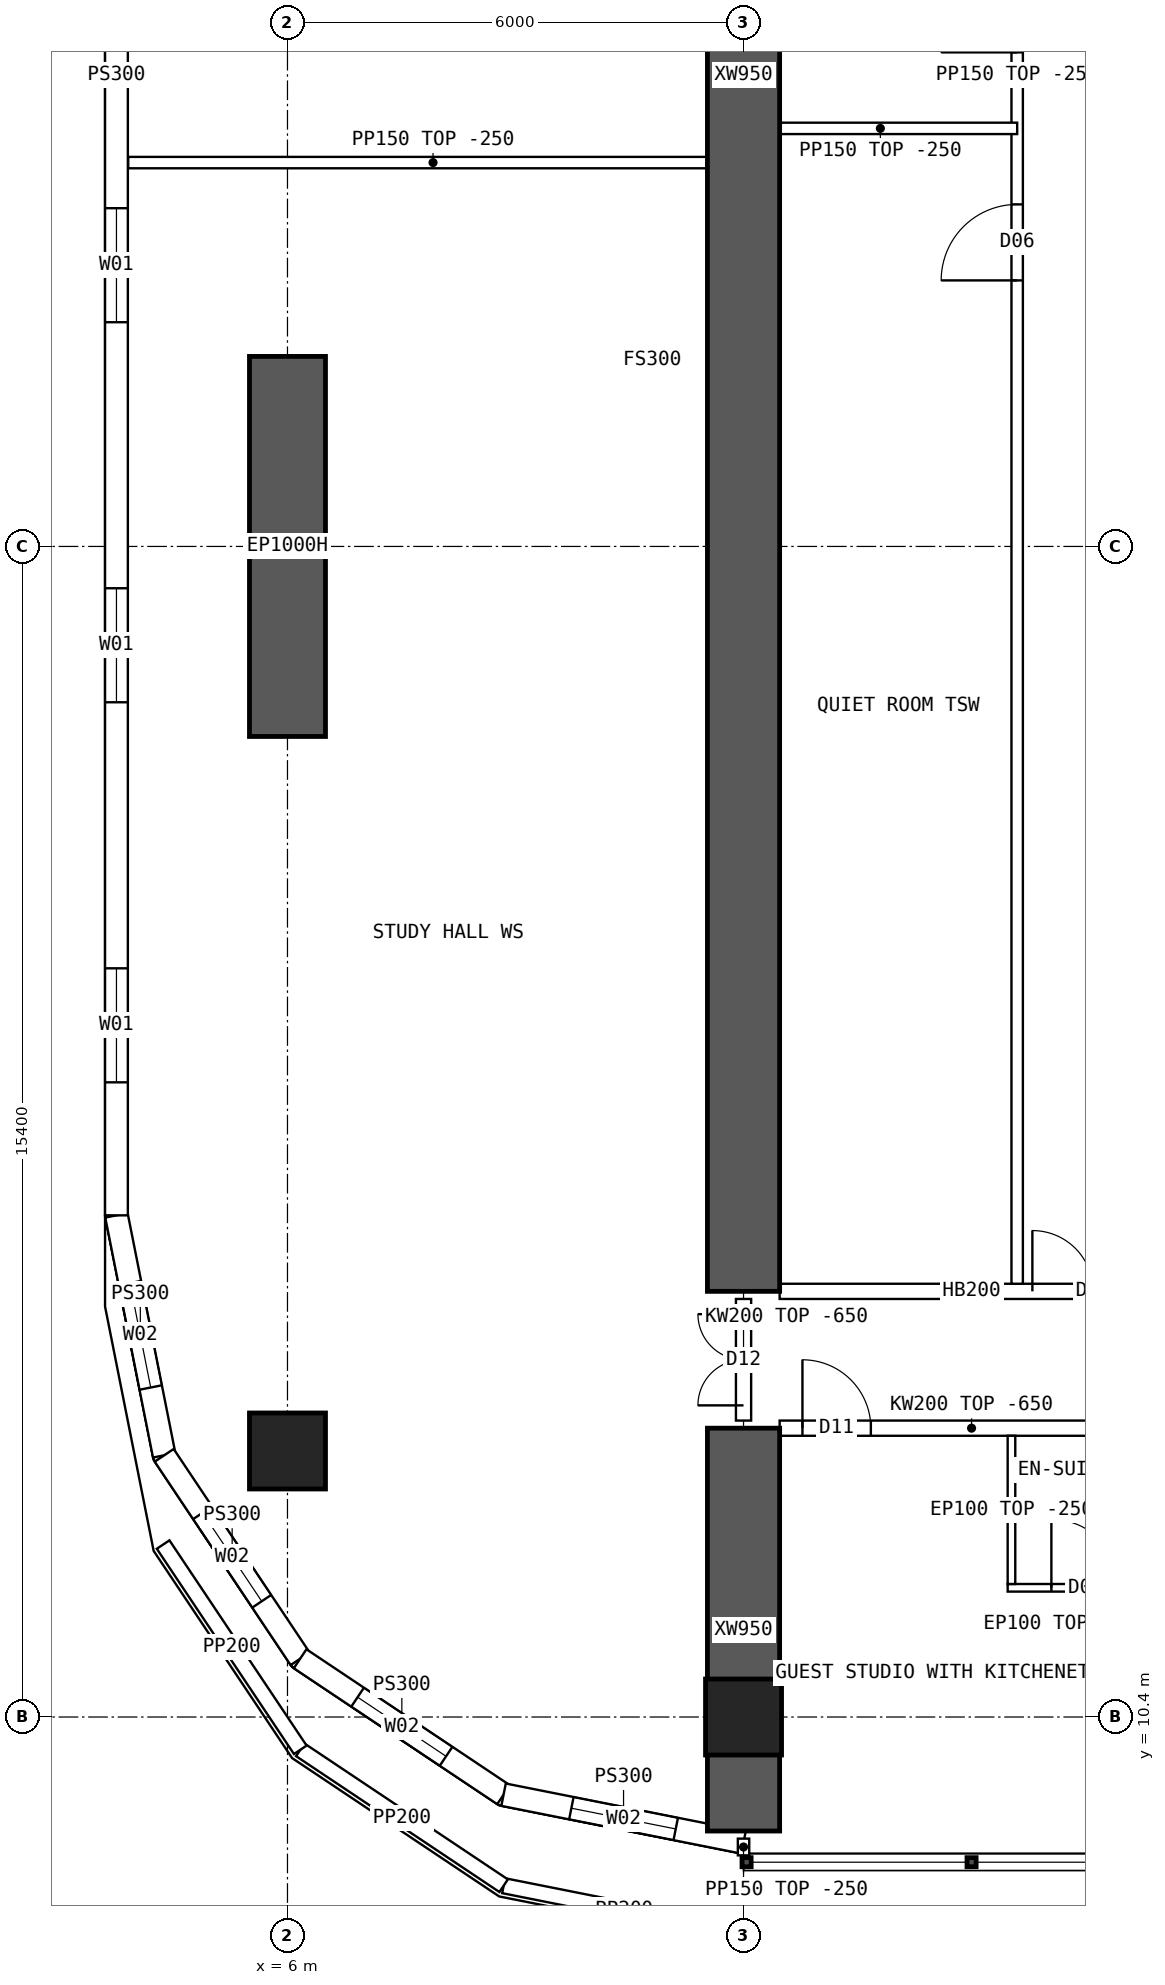
"""IFC4 building model, lengths in metres.
Left out: names, types, materials, properties, quantities, classifications, styles, units other than length and angle.
Written with IfcOpenShell. Run it as: python <this file> out.ifc"""

import sys

from ifc_helpers import new_model, si_unit, direction, frame, frame_2d, origin, origin_2d, place, context, subcontext, project, spatial, polyline, rectangle, hollow_rectangle, outline, extrude, element, fill, save


model = new_model("IFC4")
c1 = context("Model", 3, precision=1e-05, world=origin(), true_north=direction((0.0, 1.0)))
c2 = subcontext(c1, "Body", "Model", "MODEL_VIEW")
j1 = project(units=[si_unit("LENGTHUNIT", "METRE"), si_unit("PLANEANGLEUNIT", "RADIAN")], contexts=[c1])
p1 = place(None, origin())
s1 = spatial("IfcSite", under=j1, at=p1, CompositionType="ELEMENT")
p2 = place(p1, origin())
s2 = spatial("IfcBuilding", under=s1, at=p2, CompositionType="ELEMENT")
p3 = place(p2, frame((0.0, 0.0, 76.15)))
s3 = spatial("IfcBuildingStorey", under=s2, at=p3, CompositionType="ELEMENT", Elevation=76.15)
for number, where, z_axis, x_axis in (
    (1, (12.0, 10.4, 0.0), (0.0, 0.0, 1.0), (1.0, 0.0, 0.0)),
    (2, (6.0, 13.9, 0.0), (0.0, 0.0, 1.0), (1.0, 0.0, 0.0)),
):
    element("IfcColumn", number, at=place(p3, frame(where, z_axis=z_axis, x_axis=x_axis)), inside=s3, PredefinedType="COLUMN", context=c2, shape_type="SweptSolid", body=[
        extrude(hollow_rectangle(XDim=1.0, YDim=1.0, WallThickness=0.1, at=origin_2d()), origin(), (0.0, 0.0, 1.0), 4.5),
    ])
p4 = place(p3, frame((6.0, 23.3, 0.0), z_axis=(0.0, 0.0, 1.0), x_axis=(0.0, 1.0, 0.0)))
e3 = element("IfcWall", 3, at=p4, inside=s3, PredefinedType="SHEAR", context=c2, shape_type="SweptSolid", body=[
    extrude(rectangle(XDim=5.0, YDim=1.0, at=frame_2d((2.5, 0.0))), origin(), (0.0, 0.0, 1.0), 4.5),
])
p5 = place(p3, frame((12.0, 8.9, 0.0), z_axis=(0.0, 0.0, 1.0), x_axis=(0.0, 1.0, 0.0)))
e4 = element("IfcWall", 4, at=p5, inside=s3, PredefinedType="SHEAR", context=c2, shape_type="SweptSolid", body=[
    extrude(rectangle(XDim=5.3, YDim=0.95, at=frame_2d((2.65, 0.0))), origin(), (0.0, 0.0, 1.0), 4.5),
])
p6 = place(p3, frame((12.0, 16.0, 0.0), z_axis=(0.0, 0.0, 1.0), x_axis=(0.0, 1.0, 0.0)))
e5 = element("IfcWall", 5, at=p6, inside=s3, PredefinedType="SHEAR", context=c2, shape_type="SweptSolid", body=[
    extrude(rectangle(XDim=32.0, YDim=0.95, at=frame_2d((16.0, 0.0))), origin(), (0.0, 0.0, 1.0), 4.5),
])
p7 = place(p3, frame((3.75, 47.0, 0.0), z_axis=(0.0, 0.0, 1.0), x_axis=(0.0, -1.0, 0.0)))
e6 = element("IfcWall", 6, at=p7, inside=s3, PredefinedType="SOLIDWALL", context=c2, shape_type="SweptSolid", body=[
    extrude(outline(polyline([(-0.015, -0.15), (30.015, -0.15), (29.985, 0.15), (0.015, 0.15), (-0.015, -0.15)])), origin(), (0.0, 0.0, 1.0), 4.25),
])
p8 = place(p7, frame((1.75, 0.0, 0.9)))
e7 = element("IfcOpeningElement", 7, at=p8, cuts=e6, PredefinedType="OPENING", context=c2, shape_type="SweptSolid", body=[
    extrude(rectangle(XDim=1.5, YDim=2.0, at=frame_2d((0.75, 1.0))), frame((0.0, 0.16, 0.0), z_axis=(0.0, -1.0, 0.0), x_axis=(1.0, 0.0, 0.0)), (0.0, 0.0, 1.0), 0.32),
])
p9 = place(p7, frame((6.75, 0.0, 0.9)))
e8 = element("IfcOpeningElement", 8, at=p9, cuts=e6, PredefinedType="OPENING", context=c2, shape_type="SweptSolid", body=[
    extrude(rectangle(XDim=1.5, YDim=2.0, at=frame_2d((0.75, 1.0))), frame((0.0, 0.16, 0.0), z_axis=(0.0, -1.0, 0.0), x_axis=(1.0, 0.0, 0.0)), (0.0, 0.0, 1.0), 0.32),
])
p10 = place(p7, frame((11.75, 0.0, 0.9)))
e9 = element("IfcOpeningElement", 9, at=p10, cuts=e6, PredefinedType="OPENING", context=c2, shape_type="SweptSolid", body=[
    extrude(rectangle(XDim=1.5, YDim=2.0, at=frame_2d((0.75, 1.0))), frame((0.0, 0.16, 0.0), z_axis=(0.0, -1.0, 0.0), x_axis=(1.0, 0.0, 0.0)), (0.0, 0.0, 1.0), 0.32),
])
p11 = place(p7, frame((16.75, 0.0, 0.9)))
e10 = element("IfcOpeningElement", 10, at=p11, cuts=e6, PredefinedType="OPENING", context=c2, shape_type="SweptSolid", body=[
    extrude(rectangle(XDim=1.5, YDim=2.0, at=frame_2d((0.75, 1.0))), frame((0.0, 0.16, 0.0), z_axis=(0.0, -1.0, 0.0), x_axis=(1.0, 0.0, 0.0)), (0.0, 0.0, 1.0), 0.32),
])
p12 = place(p7, frame((21.75, 0.0, 0.9)))
e11 = element("IfcOpeningElement", 11, at=p12, cuts=e6, PredefinedType="OPENING", context=c2, shape_type="SweptSolid", body=[
    extrude(rectangle(XDim=1.5, YDim=2.0, at=frame_2d((0.75, 1.0))), frame((0.0, 0.16, 0.0), z_axis=(0.0, -1.0, 0.0), x_axis=(1.0, 0.0, 0.0)), (0.0, 0.0, 1.0), 0.32),
])
p13 = place(p7, frame((26.75, 0.0, 0.9)))
e12 = element("IfcOpeningElement", 12, at=p13, cuts=e6, PredefinedType="OPENING", context=c2, shape_type="SweptSolid", body=[
    extrude(rectangle(XDim=1.5, YDim=2.0, at=frame_2d((0.75, 1.0))), frame((0.0, 0.16, 0.0), z_axis=(0.0, -1.0, 0.0), x_axis=(1.0, 0.0, 0.0)), (0.0, 0.0, 1.0), 0.32),
])
p14 = place(p3, frame((3.75, 17.0, 0.0), z_axis=(0.0, 0.0, 1.0), x_axis=(0.195080412259, -0.980787251524, 0.0)))
e13 = element("IfcWall", 13, at=p14, inside=s3, PredefinedType="SOLIDWALL", context=c2, shape_type="SweptSolid", body=[
    extrude(outline(polyline([(-0.015, -0.15), (3.249, -0.15), (3.189, 0.15), (0.015, 0.15), (-0.015, -0.15)])), origin(), (0.0, 0.0, 1.0), 4.25),
])
p15 = place(p14, frame((0.909, 0.0, 0.9)))
e14 = element("IfcOpeningElement", 14, at=p15, cuts=e13, PredefinedType="OPENING", context=c2, shape_type="SweptSolid", body=[
    extrude(rectangle(XDim=1.4, YDim=1.8, at=frame_2d((0.7, 0.9))), frame((0.0, 0.16, 0.0), z_axis=(0.0, -1.0, 0.0), x_axis=(1.0, 0.0, 0.0)), (0.0, 0.0, 1.0), 0.32),
])
p16 = place(p3, frame((4.378, 13.843, 0.0), z_axis=(0.0, 0.0, 1.0), x_axis=(0.555609954424, -0.831443069936, 0.0)))
e15 = element("IfcWall", 15, at=p16, inside=s3, PredefinedType="SOLIDWALL", context=c2, shape_type="SweptSolid", body=[
    extrude(outline(polyline([(-0.03, -0.15), (3.249, -0.15), (3.189, 0.15), (0.03, 0.15), (-0.03, -0.15)])), origin(), (0.0, 0.0, 1.0), 4.25),
])
p17 = place(p16, frame((0.909, 0.0, 0.9)))
e16 = element("IfcOpeningElement", 16, at=p17, cuts=e15, PredefinedType="OPENING", context=c2, shape_type="SweptSolid", body=[
    extrude(rectangle(XDim=1.4, YDim=1.8, at=frame_2d((0.7, 0.9))), frame((0.0, 0.16, 0.0), z_axis=(0.0, -1.0, 0.0), x_axis=(1.0, 0.0, 0.0)), (0.0, 0.0, 1.0), 0.32),
])
p18 = place(p3, frame((6.167, 11.167, 0.0), z_axis=(0.0, 0.0, 1.0), x_axis=(0.831443069936, -0.555609954424, 0.0)))
e17 = element("IfcWall", 17, at=p18, inside=s3, PredefinedType="SOLIDWALL", context=c2, shape_type="SweptSolid", body=[
    extrude(outline(polyline([(-0.03, -0.15), (3.249, -0.15), (3.189, 0.15), (0.03, 0.15), (-0.03, -0.15)])), origin(), (0.0, 0.0, 1.0), 4.25),
])
p19 = place(p18, frame((0.909, 0.0, 0.9)))
e18 = element("IfcOpeningElement", 18, at=p19, cuts=e17, PredefinedType="OPENING", context=c2, shape_type="SweptSolid", body=[
    extrude(rectangle(XDim=1.4, YDim=1.8, at=frame_2d((0.7, 0.9))), frame((0.0, 0.16, 0.0), z_axis=(0.0, -1.0, 0.0), x_axis=(1.0, 0.0, 0.0)), (0.0, 0.0, 1.0), 0.32),
])
p20 = place(p3, frame((8.843, 9.378, 0.0), z_axis=(0.0, 0.0, 1.0), x_axis=(0.980787251524, -0.195080412259, 0.0)))
e19 = element("IfcWall", 19, at=p20, inside=s3, PredefinedType="SOLIDWALL", context=c2, shape_type="SweptSolid", body=[
    extrude(outline(polyline([(-0.03, -0.15), (3.249, -0.15), (3.189, 0.15), (0.03, 0.15), (-0.03, -0.15)])), origin(), (0.0, 0.0, 1.0), 4.25),
])
p21 = place(p20, frame((0.909, 0.0, 0.9)))
e20 = element("IfcOpeningElement", 20, at=p21, cuts=e19, PredefinedType="OPENING", context=c2, shape_type="SweptSolid", body=[
    extrude(rectangle(XDim=1.4, YDim=1.8, at=frame_2d((0.7, 0.9))), frame((0.0, 0.16, 0.0), z_axis=(0.0, -1.0, 0.0), x_axis=(1.0, 0.0, 0.0)), (0.0, 0.0, 1.0), 0.32),
])
p22 = place(p3, frame((12.015, 7.55, 0.0), z_axis=(0.0, 0.0, 1.0), x_axis=(-0.980792126237, 0.195055902531, 0.0)))
e21 = element("IfcWall", 21, at=p22, inside=s3, PredefinedType="PARAPET", context=c2, shape_type="SweptSolid", body=[
    extrude(rectangle(XDim=3.233, YDim=0.2, at=frame_2d((1.616, 0.0))), origin(), (0.0, 0.0, 1.0), 1.1),
])
p23 = place(p3, frame((8.844, 8.181, 0.0), z_axis=(0.0, 0.0, 1.0), x_axis=(-0.831454530953, 0.555592803191, 0.0)))
e22 = element("IfcWall", 22, at=p23, inside=s3, PredefinedType="PARAPET", context=c2, shape_type="SweptSolid", body=[
    extrude(rectangle(XDim=3.218, YDim=0.2, at=frame_2d((1.609, 0.0))), origin(), (0.0, 0.0, 1.0), 1.1),
])
p24 = place(p3, frame((6.168, 9.969, 0.0), z_axis=(0.0, 0.0, 1.0), x_axis=(-0.555584580696, 0.831460025312, 0.0)))
e23 = element("IfcWall", 23, at=p24, inside=s3, PredefinedType="PARAPET", context=c2, shape_type="SweptSolid", body=[
    extrude(rectangle(XDim=3.248, YDim=0.2, at=frame_2d((1.624, 0.0))), origin(), (0.0, 0.0, 1.0), 1.1),
])
p25 = place(p3, frame((12.475, 14.2, 0.0), z_axis=(0.0, 0.0, 1.0), x_axis=(1.0, 0.0, 0.0)))
e24 = element("IfcWall", 24, at=p25, inside=s3, PredefinedType="SOLIDWALL", context=c2, shape_type="SweptSolid", body=[
    extrude(outline(polyline([(0.0, 0.0), (5.05, 0.0), (5.05, 3.85), (0.0, 3.85), (0.0, 0.0)])), frame((0.0, 0.1, 0.0), z_axis=(0.0, -1.0, 0.0), x_axis=(1.0, 0.0, 0.0)), (0.0, 0.0, 1.0), 0.2),
])
p26 = place(p25, frame((0.3, 0.0, 0.0)))
e25 = element("IfcOpeningElement", 25, at=p26, cuts=e24, PredefinedType="OPENING", context=c2, shape_type="SweptSolid", body=[
    extrude(rectangle(XDim=0.9, YDim=2.1, at=frame_2d((0.45, 1.05))), frame((0.0, 0.11, 0.0), z_axis=(0.0, -1.0, 0.0), x_axis=(1.0, 0.0, 0.0)), (0.0, 0.0, 1.0), 0.22),
])
p27 = place(p3, frame((12.475, 16.0, 0.0), z_axis=(0.0, 0.0, 1.0), x_axis=(1.0, 0.0, 0.0)))
e26 = element("IfcWall", 26, at=p27, inside=s3, PredefinedType="SOLIDWALL", context=c2, shape_type="SweptSolid", body=[
    extrude(rectangle(XDim=5.05, YDim=0.2, at=frame_2d((2.525, 0.0))), origin(), (0.0, 0.0, 1.0), 4.25),
])
p28 = place(p27, frame((3.325, 0.0, 0.0)))
e27 = element("IfcOpeningElement", 27, at=p28, cuts=e26, PredefinedType="OPENING", context=c2, shape_type="SweptSolid", body=[
    extrude(rectangle(XDim=1.6, YDim=2.1, at=frame_2d((0.8, 1.05))), frame((0.0, 0.11, 0.0), z_axis=(0.0, -1.0, 0.0), x_axis=(1.0, 0.0, 0.0)), (0.0, 0.0, 1.0), 0.22),
])
p29 = place(p3, frame((17.525, 12.1, 0.0), z_axis=(0.0, 0.0, 1.0), x_axis=(-1.0, 0.0, 0.0)))
e28 = element("IfcWall", 28, at=p29, inside=s3, PredefinedType="PARTITIONING", context=c2, shape_type="SweptSolid", body=[
    extrude(rectangle(XDim=2.05, YDim=0.1, at=frame_2d((1.025, 0.0))), origin(), (0.0, 0.0, 1.0), 4.25),
])
p30 = place(p29, frame((0.575, 0.0, 0.0)))
e29 = element("IfcOpeningElement", 29, at=p30, cuts=e28, PredefinedType="OPENING", context=c2, shape_type="SweptSolid", body=[
    extrude(rectangle(XDim=0.9, YDim=2.1, at=frame_2d((0.45, 1.05))), frame((0.0, 0.06, 0.0), z_axis=(0.0, -1.0, 0.0), x_axis=(1.0, 0.0, 0.0)), (0.0, 0.0, 1.0), 0.12),
])
p31 = place(p3, frame((15.525, 12.15, 0.0), z_axis=(0.0, 0.0, 1.0), x_axis=(0.0, 1.0, 0.0)))
e30 = element("IfcWall", 30, at=p31, inside=s3, PredefinedType="PARTITIONING", context=c2, shape_type="SweptSolid", body=[
    extrude(outline(polyline([(0.0, 0.0), (1.95, 0.0), (1.95, 3.85), (1.902, 3.85), (1.9, 4.25), (0.0, 4.25), (0.0, 0.0)])), frame((0.0, 0.05, 0.0), z_axis=(0.0, -1.0, 0.0), x_axis=(1.0, 0.0, 0.0)), (0.0, 0.0, 1.0), 0.1),
])
p32 = place(p3, frame((15.6, 16.1, 0.0), z_axis=(0.0, 0.0, 1.0), x_axis=(0.0, 1.0, 0.0)))
e31 = element("IfcWall", 31, at=p32, inside=s3, PredefinedType="PARTITIONING", context=c2, shape_type="SweptSolid", body=[
    extrude(rectangle(XDim=31.8, YDim=0.15, at=frame_2d((15.9, 0.0))), origin(), (0.0, 0.0, 1.0), 4.25),
])
p33 = place(p32, frame((13.2, 0.0, 0.0)))
e32 = element("IfcOpeningElement", 32, at=p33, cuts=e31, PredefinedType="OPENING", context=c2, shape_type="SweptSolid", body=[
    extrude(rectangle(XDim=1.0, YDim=2.1, at=frame_2d((0.5, 1.05))), frame((0.0, 0.085, 0.0), z_axis=(0.0, -1.0, 0.0), x_axis=(1.0, 0.0, 0.0)), (0.0, 0.0, 1.0), 0.17),
])
p34 = place(p32, frame((16.2, 0.0, 0.0)))
e33 = element("IfcOpeningElement", 33, at=p34, cuts=e31, PredefinedType="OPENING", context=c2, shape_type="SweptSolid", body=[
    extrude(rectangle(XDim=1.0, YDim=2.1, at=frame_2d((0.5, 1.05))), frame((0.0, 0.085, 0.0), z_axis=(0.0, -1.0, 0.0), x_axis=(1.0, 0.0, 0.0)), (0.0, 0.0, 1.0), 0.17),
])
p35 = place(p3, frame((12.0, 31.3, 0.0), z_axis=(0.0, 0.0, 1.0), x_axis=(1.0, 0.0, 0.0)))
e34 = element("IfcWall", 34, at=p35, inside=s3, PredefinedType="PARTITIONING", context=c2, shape_type="SweptSolid", body=[
    extrude(rectangle(XDim=3.6, YDim=0.15, at=frame_2d((1.8, 0.0))), origin(), (0.0, 0.0, 1.0), 4.25),
])
p36 = place(p3, frame((3.905, 30.85, 0.0), z_axis=(0.0, 0.0, 1.0), x_axis=(1.0, 0.0, 0.0)))
e35 = element("IfcWall", 35, at=p36, inside=s3, PredefinedType="PARTITIONING", context=c2, shape_type="SweptSolid", body=[
    extrude(outline(polyline([(0.0, 0.0), (8.02, 0.0), (8.02, 4.25), (2.397, 4.25), (2.395, 3.8), (1.797, 3.8), (1.795, 4.25), (0.0, 4.25), (0.0, 0.0)])), frame((0.0, 0.075, 0.0), z_axis=(0.0, -1.0, 0.0), x_axis=(1.0, 0.0, 0.0)), (0.0, 0.0, 1.0), 0.15),
])
p37 = place(p3, frame((12.0, 14.3, 0.0), z_axis=(0.0, 0.0, 1.0), x_axis=(0.0, 1.0, 0.0)))
e36 = element("IfcWall", 36, at=p37, inside=s3, PredefinedType="SOLIDWALL", context=c2, shape_type="SweptSolid", body=[
    extrude(outline(polyline([(0.0, 0.0), (1.6, 0.0), (1.6, 3.85), (0.0, 3.85), (0.0, 0.0)])), frame((0.0, 0.1, 0.0), z_axis=(0.0, -1.0, 0.0), x_axis=(1.0, 0.0, 0.0)), (0.0, 0.0, 1.0), 0.2),
])
p38 = place(p37, frame((0.2, 0.0, 0.0)))
e37 = element("IfcOpeningElement", 37, at=p38, cuts=e36, PredefinedType="OPENING", context=c2, shape_type="SweptSolid", body=[
    extrude(rectangle(XDim=1.2, YDim=2.1, at=frame_2d((0.6, 1.05))), frame((0.0, 0.11, 0.0), z_axis=(0.0, -1.0, 0.0), x_axis=(1.0, 0.0, 0.0)), (0.0, 0.0, 1.0), 0.22),
])
p39 = place(p3, frame((12.0, 8.8, 0.0), z_axis=(0.0, 0.0, 1.0), x_axis=(0.0, -1.0, 0.0)))
e38 = element("IfcWall", 38, at=p39, inside=s3, PredefinedType="PARTITIONING", context=c2, shape_type="SweptSolid", body=[
    extrude(rectangle(XDim=0.22, YDim=0.15, at=frame_2d((0.11, 0.0))), origin(), (0.0, 0.0, 1.0), 4.25),
])
p40 = place(p11, origin())
e39 = element("IfcWindow", 39, at=p40, inside=s3, PartitioningType="SINGLE_PANEL", PredefinedType="WINDOW", context=c2, shape_type="SweptSolid", body=[
    extrude(rectangle(XDim=1.5, YDim=2.0, at=frame_2d((0.75, 1.0))), frame((0.0, 0.03, 0.0), z_axis=(0.0, -1.0, 0.0), x_axis=(1.0, 0.0, 0.0)), (0.0, 0.0, 1.0), 0.06),
])
fill(e10, e39)
p41 = place(p12, origin())
e40 = element("IfcWindow", 40, at=p41, inside=s3, PartitioningType="SINGLE_PANEL", PredefinedType="WINDOW", context=c2, shape_type="SweptSolid", body=[
    extrude(rectangle(XDim=1.5, YDim=2.0, at=frame_2d((0.75, 1.0))), frame((0.0, 0.03, 0.0), z_axis=(0.0, -1.0, 0.0), x_axis=(1.0, 0.0, 0.0)), (0.0, 0.0, 1.0), 0.06),
])
fill(e11, e40)
p42 = place(p13, origin())
e41 = element("IfcWindow", 41, at=p42, inside=s3, PartitioningType="SINGLE_PANEL", PredefinedType="WINDOW", context=c2, shape_type="SweptSolid", body=[
    extrude(rectangle(XDim=1.5, YDim=2.0, at=frame_2d((0.75, 1.0))), frame((0.0, 0.03, 0.0), z_axis=(0.0, -1.0, 0.0), x_axis=(1.0, 0.0, 0.0)), (0.0, 0.0, 1.0), 0.06),
])
fill(e12, e41)
p43 = place(p15, origin())
e42 = element("IfcWindow", 42, at=p43, inside=s3, PartitioningType="SINGLE_PANEL", PredefinedType="WINDOW", context=c2, shape_type="SweptSolid", body=[
    extrude(rectangle(XDim=1.4, YDim=1.8, at=frame_2d((0.7, 0.9))), frame((0.0, 0.03, 0.0), z_axis=(0.0, -1.0, 0.0), x_axis=(1.0, 0.0, 0.0)), (0.0, 0.0, 1.0), 0.06),
])
fill(e14, e42)
p44 = place(p17, origin())
e43 = element("IfcWindow", 43, at=p44, inside=s3, PartitioningType="SINGLE_PANEL", PredefinedType="WINDOW", context=c2, shape_type="SweptSolid", body=[
    extrude(rectangle(XDim=1.4, YDim=1.8, at=frame_2d((0.7, 0.9))), frame((0.0, 0.03, 0.0), z_axis=(0.0, -1.0, 0.0), x_axis=(1.0, 0.0, 0.0)), (0.0, 0.0, 1.0), 0.06),
])
fill(e16, e43)
p45 = place(p19, origin())
e44 = element("IfcWindow", 44, at=p45, inside=s3, PartitioningType="SINGLE_PANEL", PredefinedType="WINDOW", context=c2, shape_type="SweptSolid", body=[
    extrude(rectangle(XDim=1.4, YDim=1.8, at=frame_2d((0.7, 0.9))), frame((0.0, 0.03, 0.0), z_axis=(0.0, -1.0, 0.0), x_axis=(1.0, 0.0, 0.0)), (0.0, 0.0, 1.0), 0.06),
])
fill(e18, e44)
p46 = place(p21, origin())
e45 = element("IfcWindow", 45, at=p46, inside=s3, PartitioningType="SINGLE_PANEL", PredefinedType="WINDOW", context=c2, shape_type="SweptSolid", body=[
    extrude(rectangle(XDim=1.4, YDim=1.8, at=frame_2d((0.7, 0.9))), frame((0.0, 0.03, 0.0), z_axis=(0.0, -1.0, 0.0), x_axis=(1.0, 0.0, 0.0)), (0.0, 0.0, 1.0), 0.06),
])
fill(e20, e45)
p47 = place(p28, origin())
e46 = element("IfcDoor", 46, at=p47, inside=s3, OperationType="DOUBLE_DOOR_SINGLE_SWING", PredefinedType="DOOR", context=c2, shape_type="SweptSolid", body=[
    extrude(rectangle(XDim=1.6, YDim=2.1, at=frame_2d((0.8, 1.05))), frame((0.0, 0.025, 0.0), z_axis=(0.0, -1.0, 0.0), x_axis=(1.0, 0.0, 0.0)), (0.0, 0.0, 1.0), 0.05),
])
fill(e27, e46)
p48 = place(p30, origin())
e47 = element("IfcDoor", 47, at=p48, inside=s3, OperationType="SINGLE_SWING_RIGHT", PredefinedType="DOOR", context=c2, shape_type="SweptSolid", body=[
    extrude(rectangle(XDim=0.9, YDim=2.1, at=frame_2d((0.45, 1.05))), frame((0.0, 0.025, 0.0), z_axis=(0.0, -1.0, 0.0), x_axis=(1.0, 0.0, 0.0)), (0.0, 0.0, 1.0), 0.05),
])
fill(e29, e47)
p49 = place(p26, origin())
e48 = element("IfcDoor", 48, at=p49, inside=s3, OperationType="SINGLE_SWING_LEFT", PredefinedType="DOOR", context=c2, shape_type="SweptSolid", body=[
    extrude(rectangle(XDim=0.9, YDim=2.1, at=frame_2d((0.45, 1.05))), frame((0.0, 0.025, 0.0), z_axis=(0.0, -1.0, 0.0), x_axis=(1.0, 0.0, 0.0)), (0.0, 0.0, 1.0), 0.05),
])
fill(e25, e48)
p50 = place(p33, origin())
e49 = element("IfcDoor", 49, at=p50, inside=s3, OperationType="SINGLE_SWING_LEFT", PredefinedType="DOOR", context=c2, shape_type="SweptSolid", body=[
    extrude(rectangle(XDim=1.0, YDim=2.1, at=frame_2d((0.5, 1.05))), frame((0.0, 0.025, 0.0), z_axis=(0.0, -1.0, 0.0), x_axis=(1.0, 0.0, 0.0)), (0.0, 0.0, 1.0), 0.05),
])
fill(e32, e49)
p51 = place(p38, origin())
e50 = element("IfcDoor", 50, at=p51, inside=s3, OperationType="DOUBLE_DOOR_SINGLE_SWING", PredefinedType="DOOR", context=c2, shape_type="SweptSolid", body=[
    extrude(rectangle(XDim=1.2, YDim=2.1, at=frame_2d((0.6, 1.05))), frame((0.0, 0.025, 0.0), z_axis=(0.0, -1.0, 0.0), x_axis=(1.0, 0.0, 0.0)), (0.0, 0.0, 1.0), 0.05),
])
fill(e37, e50)
save(model, sys.argv[1])
